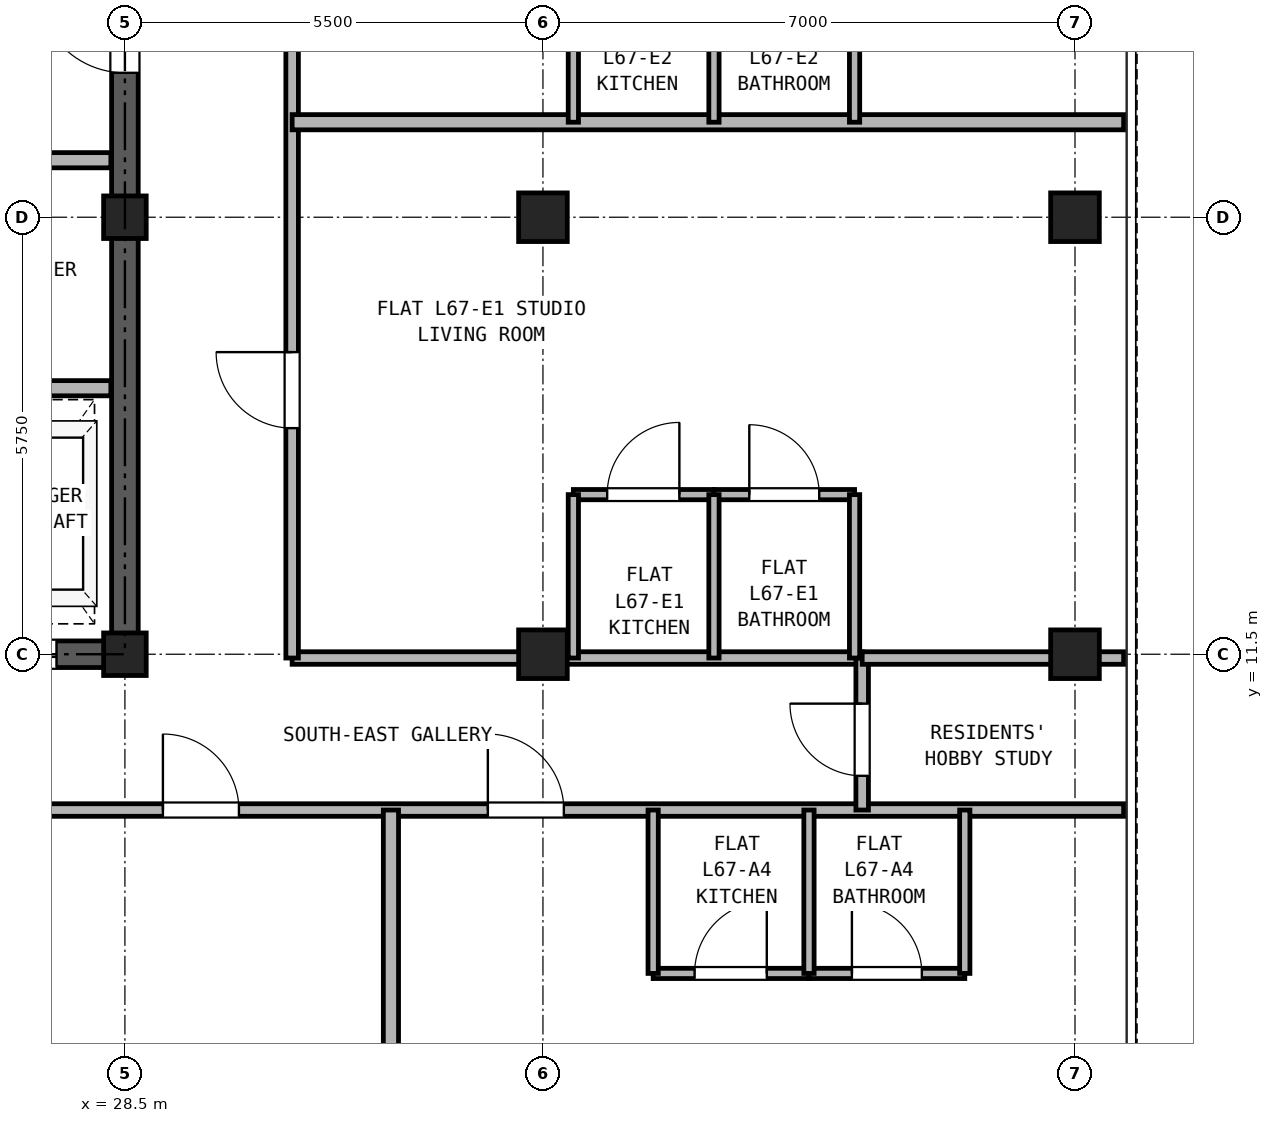
"""IFC4 building model, lengths in metres.
Left out: names, types, materials, properties, quantities, classifications, styles, units other than length and angle.
Written with IfcOpenShell. Run it as: python <this file> out.ifc"""

import sys

from ifc_helpers import new_model, si_unit, direction, frame, frame_2d, origin, origin_2d, place, context, subcontext, project, spatial, rectangle, hollow_rectangle, extrude, source, transform, mapped, element, fill, save


model = new_model("IFC4")
c1 = context("Model", 3, precision=1e-05, world=origin(), true_north=direction((0.0, 1.0)))
c2 = subcontext(c1, "Body", "Model", "MODEL_VIEW")
j1 = project(units=[si_unit("LENGTHUNIT", "METRE"), si_unit("PLANEANGLEUNIT", "RADIAN")], contexts=[c1])
p1 = place(None, origin())
s1 = spatial("IfcSite", under=j1, at=p1, CompositionType="ELEMENT")
p2 = place(p1, origin())
s2 = spatial("IfcBuilding", under=s1, at=p2, CompositionType="ELEMENT")
p3 = place(p2, frame((0.0, 0.0, 236.1)))
s3 = spatial("IfcBuildingStorey", under=s2, at=p3, CompositionType="ELEMENT", Elevation=236.1)
m1 = source(origin(), c2, "Body", "SweptSolid", [
    extrude(hollow_rectangle(XDim=0.64, YDim=0.64, WallThickness=0.035, at=origin_2d()), origin(), (0.0, 0.0, 1.0), 2.98),
])
for number, where, z_axis, x_axis in (
    (1, (41.0, 11.5, 0.0), (0.0, 0.0, 1.0), (1.0, 0.0, 0.0)),
    (2, (41.0, 17.25, 0.0), (0.0, 0.0, 1.0), (1.0, 0.0, 0.0)),
):
    element("IfcColumn", number, at=place(p3, frame(where, z_axis=z_axis, x_axis=x_axis)), inside=s3, PredefinedType="COLUMN", context=c2, shape_type="MappedRepresentation", body=[
        mapped(m1, transform((0.0, 0.0, 0.0), x_axis=(1.0, 0.0, 0.0), y_axis=(0.0, 1.0, 0.0), z_axis=(0.0, 0.0, 1.0), scale=1.0)),
    ])
m2 = source(origin(), c2, "Body", "SweptSolid", [
    extrude(hollow_rectangle(XDim=0.56, YDim=0.56, WallThickness=0.03, at=origin_2d()), origin(), (0.0, 0.0, 1.0), 2.98),
])
for number, where, z_axis, x_axis in (
    (3, (28.5, 11.5, 0.0), (0.0, 0.0, 1.0), (1.0, 0.0, 0.0)),
    (4, (28.5, 17.25, 0.0), (0.0, 0.0, 1.0), (1.0, 0.0, 0.0)),
):
    element("IfcColumn", number, at=place(p3, frame(where, z_axis=z_axis, x_axis=x_axis)), inside=s3, PredefinedType="COLUMN", context=c2, shape_type="MappedRepresentation", body=[
        mapped(m2, transform((0.0, 0.0, 0.0), x_axis=(1.0, 0.0, 0.0), y_axis=(0.0, 1.0, 0.0), z_axis=(0.0, 0.0, 1.0), scale=1.0)),
    ])
for number, where, z_axis, x_axis in (
    (5, (34.0, 11.5, 0.0), (0.0, 0.0, 1.0), (1.0, 0.0, 0.0)),
    (6, (34.0, 17.25, 0.0), (0.0, 0.0, 1.0), (1.0, 0.0, 0.0)),
):
    element("IfcColumn", number, at=place(p3, frame(where, z_axis=z_axis, x_axis=x_axis)), inside=s3, PredefinedType="COLUMN", context=c2, shape_type="MappedRepresentation", body=[
        mapped(m1, transform((0.0, 0.0, 0.0), x_axis=(1.0, 0.0, 0.0), y_axis=(0.0, 1.0, 0.0), z_axis=(0.0, 0.0, 1.0), scale=1.0)),
    ])
p4 = place(p3, frame((18.325, 11.5, 0.0), z_axis=(0.0, 0.0, 1.0), x_axis=(1.0, 0.0, 0.0)))
e7 = element("IfcWall", 7, at=p4, inside=s3, PredefinedType="SHEAR", context=c2, shape_type="SweptSolid", body=[
    extrude(rectangle(XDim=10.35, YDim=0.35, at=frame_2d((5.175, 0.0))), origin(), (0.0, 0.0, 1.0), 2.98),
])
p5 = place(p4, frame((1.775, 0.0, 0.0)))
e8 = element("IfcOpeningElement", 8, at=p5, cuts=e7, PredefinedType="OPENING", context=c2, shape_type="SweptSolid", body=[
    extrude(rectangle(XDim=0.95, YDim=2.15, at=frame_2d((0.475, 1.075))), frame((0.0, 0.185, 0.0), z_axis=(0.0, -1.0, 0.0), x_axis=(1.0, 0.0, 0.0)), (0.0, 0.0, 1.0), 0.37),
])
p6 = place(p4, frame((5.275, 0.0, 0.0)))
e9 = element("IfcOpeningElement", 9, at=p6, cuts=e7, PredefinedType="OPENING", context=c2, shape_type="SweptSolid", body=[
    extrude(rectangle(XDim=0.95, YDim=2.15, at=frame_2d((0.475, 1.075))), frame((0.0, 0.185, 0.0), z_axis=(0.0, -1.0, 0.0), x_axis=(1.0, 0.0, 0.0)), (0.0, 0.0, 1.0), 0.37),
])
p7 = place(p4, frame((8.175, 0.0, 0.0)))
e10 = element("IfcOpeningElement", 10, at=p7, cuts=e7, PredefinedType="OPENING", context=c2, shape_type="SweptSolid", body=[
    extrude(rectangle(XDim=1.1, YDim=2.25, at=frame_2d((0.55, 1.125))), frame((0.0, 0.185, 0.0), z_axis=(0.0, -1.0, 0.0), x_axis=(1.0, 0.0, 0.0)), (0.0, 0.0, 1.0), 0.37),
])
p8 = place(p3, frame((28.5, 11.675, 0.0), z_axis=(0.0, 0.0, 1.0), x_axis=(0.0, 1.0, 0.0)))
e11 = element("IfcWall", 11, at=p8, inside=s3, PredefinedType="SHEAR", context=c2, shape_type="SweptSolid", body=[
    extrude(rectangle(XDim=16.9, YDim=0.35, at=frame_2d((8.45, 0.0))), origin(), (0.0, 0.0, 1.0), 2.98),
])
p9 = place(p8, frame((7.475, 0.0, 0.0)))
e12 = element("IfcOpeningElement", 12, at=p9, cuts=e11, PredefinedType="OPENING", context=c2, shape_type="SweptSolid", body=[
    extrude(rectangle(XDim=1.15, YDim=2.2, at=frame_2d((0.575, 1.1))), frame((0.0, 0.185, 0.0), z_axis=(0.0, -1.0, 0.0), x_axis=(1.0, 0.0, 0.0)), (0.0, 0.0, 1.0), 0.37),
])
p10 = place(p3, frame((18.685, 18.0, 0.0), z_axis=(0.0, 0.0, 1.0), x_axis=(1.0, 0.0, 0.0)))
e13 = element("IfcWall", 13, at=p10, inside=s3, PredefinedType="PARTITIONING", context=c2, shape_type="SweptSolid", body=[
    extrude(rectangle(XDim=9.63, YDim=0.2, at=frame_2d((4.815, 0.0))), origin(), (0.0, 0.0, 1.0), 2.98),
])
p11 = place(p10, frame((0.565, 0.0, 0.0)))
e14 = element("IfcOpeningElement", 14, at=p11, cuts=e13, PredefinedType="OPENING", context=c2, shape_type="SweptSolid", body=[
    extrude(rectangle(XDim=1.3, YDim=2.3, at=frame_2d((0.65, 1.15))), frame((0.0, 0.11, 0.0), z_axis=(0.0, -1.0, 0.0), x_axis=(1.0, 0.0, 0.0)), (0.0, 0.0, 1.0), 0.22),
])
p12 = place(p10, frame((2.665, 0.0, 0.0)))
e15 = element("IfcOpeningElement", 15, at=p12, cuts=e13, PredefinedType="OPENING", context=c2, shape_type="SweptSolid", body=[
    extrude(rectangle(XDim=1.3, YDim=2.3, at=frame_2d((0.65, 1.15))), frame((0.0, 0.11, 0.0), z_axis=(0.0, -1.0, 0.0), x_axis=(1.0, 0.0, 0.0)), (0.0, 0.0, 1.0), 0.22),
])
p13 = place(p10, frame((5.065, 0.0, 0.0)))
e16 = element("IfcOpeningElement", 16, at=p13, cuts=e13, PredefinedType="OPENING", context=c2, shape_type="SweptSolid", body=[
    extrude(rectangle(XDim=0.9, YDim=2.05, at=frame_2d((0.45, 1.025))), frame((0.0, 0.11, 0.0), z_axis=(0.0, -1.0, 0.0), x_axis=(1.0, 0.0, 0.0)), (0.0, 0.0, 1.0), 0.22),
])
p14 = place(p10, frame((7.765, 0.0, 0.0)))
e17 = element("IfcOpeningElement", 17, at=p14, cuts=e13, PredefinedType="OPENING", context=c2, shape_type="SweptSolid", body=[
    extrude(rectangle(XDim=0.9, YDim=2.05, at=frame_2d((0.45, 1.025))), frame((0.0, 0.11, 0.0), z_axis=(0.0, -1.0, 0.0), x_axis=(1.0, 0.0, 0.0)), (0.0, 0.0, 1.0), 0.22),
])
p15 = place(p3, frame((18.685, 15.0, 0.0), z_axis=(0.0, 0.0, 1.0), x_axis=(1.0, 0.0, 0.0)))
e18 = element("IfcWall", 18, at=p15, inside=s3, PredefinedType="PARTITIONING", context=c2, shape_type="SweptSolid", body=[
    extrude(rectangle(XDim=9.63, YDim=0.2, at=frame_2d((4.815, 0.0))), origin(), (0.0, 0.0, 1.0), 2.98),
])
p16 = place(p3, frame((5.36, 9.45, 0.0), z_axis=(0.0, 0.0, 1.0), x_axis=(1.0, 0.0, 0.0)))
e19 = element("IfcWall", 19, at=p16, inside=s3, PredefinedType="PARTITIONING", context=c2, shape_type="SweptSolid", body=[
    extrude(rectangle(XDim=36.28, YDim=0.165, at=frame_2d((18.14, 0.0))), origin(), (0.0, 0.0, 1.0), 2.98),
])
p17 = place(p16, frame((7.115, 0.0, 0.0)))
e20 = element("IfcOpeningElement", 20, at=p17, cuts=e19, PredefinedType="OPENING", context=c2, shape_type="SweptSolid", body=[
    extrude(rectangle(XDim=1.0, YDim=2.15, at=frame_2d((0.5, 1.075))), frame((0.0, 0.093, 0.0), z_axis=(0.0, -1.0, 0.0), x_axis=(1.0, 0.0, 0.0)), (0.0, 0.0, 1.0), 0.185),
])
p18 = place(p16, frame((10.89, 0.0, 0.0)))
e21 = element("IfcOpeningElement", 21, at=p18, cuts=e19, PredefinedType="OPENING", context=c2, shape_type="SweptSolid", body=[
    extrude(rectangle(XDim=1.0, YDim=2.15, at=frame_2d((0.5, 1.075))), frame((0.0, 0.093, 0.0), z_axis=(0.0, -1.0, 0.0), x_axis=(1.0, 0.0, 0.0)), (0.0, 0.0, 1.0), 0.185),
])
p19 = place(p16, frame((23.64, 0.0, 0.0)))
e22 = element("IfcOpeningElement", 22, at=p19, cuts=e19, PredefinedType="OPENING", context=c2, shape_type="SweptSolid", body=[
    extrude(rectangle(XDim=1.0, YDim=2.15, at=frame_2d((0.5, 1.075))), frame((0.0, 0.093, 0.0), z_axis=(0.0, -1.0, 0.0), x_axis=(1.0, 0.0, 0.0)), (0.0, 0.0, 1.0), 0.185),
])
p20 = place(p16, frame((27.915, 0.0, 0.0)))
e23 = element("IfcOpeningElement", 23, at=p20, cuts=e19, PredefinedType="OPENING", context=c2, shape_type="SweptSolid", body=[
    extrude(rectangle(XDim=1.0, YDim=2.15, at=frame_2d((0.5, 1.075))), frame((0.0, 0.093, 0.0), z_axis=(0.0, -1.0, 0.0), x_axis=(1.0, 0.0, 0.0)), (0.0, 0.0, 1.0), 0.185),
])
p21 = place(p3, frame((30.7, 11.45, 0.0), z_axis=(0.0, 0.0, 1.0), x_axis=(1.0, 0.0, 0.0)))
e24 = element("IfcWall", 24, at=p21, inside=s3, PredefinedType="PARTITIONING", context=c2, shape_type="SweptSolid", body=[
    extrude(rectangle(XDim=7.5, YDim=0.165, at=frame_2d((3.75, 0.0))), origin(), (0.0, 0.0, 1.0), 2.428),
])
p22 = place(p3, frame((38.2, 9.45, 0.0), z_axis=(0.0, 0.0, 1.0), x_axis=(0.0, 1.0, 0.0)))
e25 = element("IfcWall", 25, at=p22, inside=s3, PredefinedType="PARTITIONING", context=c2, shape_type="SweptSolid", body=[
    extrude(rectangle(XDim=2.0, YDim=0.165, at=frame_2d((1.0, 0.0))), origin(), (0.0, 0.0, 1.0), 2.98),
])
p23 = place(p22, frame((0.45, 0.0, 0.0)))
e26 = element("IfcOpeningElement", 26, at=p23, cuts=e25, PredefinedType="OPENING", context=c2, shape_type="SweptSolid", body=[
    extrude(rectangle(XDim=0.95, YDim=2.15, at=frame_2d((0.475, 1.075))), frame((0.0, 0.093, 0.0), z_axis=(0.0, -1.0, 0.0), x_axis=(1.0, 0.0, 0.0)), (0.0, 0.0, 1.0), 0.185),
])
p24 = place(p3, frame((30.7, 11.45, 0.0), z_axis=(0.0, 0.0, 1.0), x_axis=(0.0, 1.0, 0.0)))
e27 = element("IfcWall", 27, at=p24, inside=s3, PredefinedType="PARTITIONING", context=c2, shape_type="SweptSolid", body=[
    extrude(rectangle(XDim=23.69, YDim=0.165, at=frame_2d((11.845, 0.0))), origin(), (0.0, 0.0, 1.0), 2.98),
])
p25 = place(p24, frame((3.025, 0.0, 0.0)))
e28 = element("IfcOpeningElement", 28, at=p25, cuts=e27, PredefinedType="OPENING", context=c2, shape_type="SweptSolid", body=[
    extrude(rectangle(XDim=1.0, YDim=2.15, at=frame_2d((0.5, 1.075))), frame((0.0, 0.093, 0.0), z_axis=(0.0, -1.0, 0.0), x_axis=(1.0, 0.0, 0.0)), (0.0, 0.0, 1.0), 0.185),
])
p26 = place(p24, frame((10.8, 0.0, 0.0)))
e29 = element("IfcOpeningElement", 29, at=p26, cuts=e27, PredefinedType="OPENING", context=c2, shape_type="SweptSolid", body=[
    extrude(rectangle(XDim=1.0, YDim=2.15, at=frame_2d((0.5, 1.075))), frame((0.0, 0.093, 0.0), z_axis=(0.0, -1.0, 0.0), x_axis=(1.0, 0.0, 0.0)), (0.0, 0.0, 1.0), 0.185),
])
p27 = place(p24, frame((16.825, 0.0, 0.0)))
e30 = element("IfcOpeningElement", 30, at=p27, cuts=e27, PredefinedType="OPENING", context=c2, shape_type="SweptSolid", body=[
    extrude(rectangle(XDim=1.0, YDim=2.15, at=frame_2d((0.5, 1.075))), frame((0.0, 0.093, 0.0), z_axis=(0.0, -1.0, 0.0), x_axis=(1.0, 0.0, 0.0)), (0.0, 0.0, 1.0), 0.185),
])
p28 = place(p3, frame((32.0, 0.16, 0.0), z_axis=(0.0, 0.0, 1.0), x_axis=(0.0, 1.0, 0.0)))
e31 = element("IfcWall", 31, at=p28, inside=s3, PredefinedType="PARTITIONING", context=c2, shape_type="SweptSolid", body=[
    extrude(rectangle(XDim=9.29, YDim=0.2, at=frame_2d((4.645, 0.0))), origin(), (0.0, 0.0, 1.0), 2.98),
])
p29 = place(p3, frame((35.45, 7.3, 0.0), z_axis=(0.0, 0.0, 1.0), x_axis=(1.0, 0.0, 0.0)))
e32 = element("IfcWall", 32, at=p29, inside=s3, PredefinedType="PARTITIONING", context=c2, shape_type="SweptSolid", body=[
    extrude(rectangle(XDim=2.05, YDim=0.135, at=frame_2d((1.025, 0.0))), origin(), (0.0, 0.0, 1.0), 2.98),
])
p30 = place(p29, frame((0.545, 0.0, 0.0)))
e33 = element("IfcOpeningElement", 33, at=p30, cuts=e32, PredefinedType="OPENING", context=c2, shape_type="SweptSolid", body=[
    extrude(rectangle(XDim=0.95, YDim=2.15, at=frame_2d((0.475, 1.075))), frame((0.0, 0.077, 0.0), z_axis=(0.0, -1.0, 0.0), x_axis=(1.0, 0.0, 0.0)), (0.0, 0.0, 1.0), 0.155),
])
p31 = place(p3, frame((37.5, 7.3, 0.0), z_axis=(0.0, 0.0, 1.0), x_axis=(1.0, 0.0, 0.0)))
e34 = element("IfcWall", 34, at=p31, inside=s3, PredefinedType="PARTITIONING", context=c2, shape_type="SweptSolid", body=[
    extrude(rectangle(XDim=2.05, YDim=0.135, at=frame_2d((1.025, 0.0))), origin(), (0.0, 0.0, 1.0), 2.98),
])
p32 = place(p31, frame((0.565, 0.0, 0.0)))
e35 = element("IfcOpeningElement", 35, at=p32, cuts=e34, PredefinedType="OPENING", context=c2, shape_type="SweptSolid", body=[
    extrude(rectangle(XDim=0.92, YDim=2.1, at=frame_2d((0.46, 1.05))), frame((0.0, 0.077, 0.0), z_axis=(0.0, -1.0, 0.0), x_axis=(1.0, 0.0, 0.0)), (0.0, 0.0, 1.0), 0.155),
])
for number, where, z_axis, x_axis in (
    (36, (35.45, 7.3, 0.0), (0.0, 0.0, 1.0), (0.0, 1.0, 0.0)),
    (37, (37.5, 7.3, 0.0), (0.0, 0.0, 1.0), (0.0, 1.0, 0.0)),
    (38, (39.55, 7.3, 0.0), (0.0, 0.0, 1.0), (0.0, 1.0, 0.0)),
):
    element("IfcWall", number, at=place(p3, frame(where, z_axis=z_axis, x_axis=x_axis)), inside=s3, PredefinedType="PARTITIONING", context=c2, shape_type="SweptSolid", body=[
        extrude(rectangle(XDim=2.15, YDim=0.135, at=frame_2d((1.075, 0.0))), origin(), (0.0, 0.0, 1.0), 2.98),
    ])
p33 = place(p3, frame((38.2, 11.45, 0.0), z_axis=(0.0, 0.0, 1.0), x_axis=(1.0, 0.0, 0.0)))
e39 = element("IfcWall", 39, at=p33, inside=s3, PredefinedType="PARTITIONING", context=c2, shape_type="SweptSolid", body=[
    extrude(rectangle(XDim=3.44, YDim=0.165, at=frame_2d((1.72, 0.0))), origin(), (0.0, 0.0, 1.0), 2.428),
])
p34 = place(p3, frame((34.4, 13.6, 0.0), z_axis=(0.0, 0.0, 1.0), x_axis=(1.0, 0.0, 0.0)))
e40 = element("IfcWall", 40, at=p34, inside=s3, PredefinedType="PARTITIONING", context=c2, shape_type="SweptSolid", body=[
    extrude(rectangle(XDim=1.85, YDim=0.135, at=frame_2d((0.925, 0.0))), origin(), (0.0, 0.0, 1.0), 2.98),
])
p35 = place(p34, frame((0.445, 0.0, 0.0)))
e41 = element("IfcOpeningElement", 41, at=p35, cuts=e40, PredefinedType="OPENING", context=c2, shape_type="SweptSolid", body=[
    extrude(rectangle(XDim=0.95, YDim=2.15, at=frame_2d((0.475, 1.075))), frame((0.0, 0.077, 0.0), z_axis=(0.0, -1.0, 0.0), x_axis=(1.0, 0.0, 0.0)), (0.0, 0.0, 1.0), 0.155),
])
p36 = place(p3, frame((36.25, 13.6, 0.0), z_axis=(0.0, 0.0, 1.0), x_axis=(1.0, 0.0, 0.0)))
e42 = element("IfcWall", 42, at=p36, inside=s3, PredefinedType="PARTITIONING", context=c2, shape_type="SweptSolid", body=[
    extrude(rectangle(XDim=1.85, YDim=0.135, at=frame_2d((0.925, 0.0))), origin(), (0.0, 0.0, 1.0), 2.98),
])
p37 = place(p36, frame((0.465, 0.0, 0.0)))
e43 = element("IfcOpeningElement", 43, at=p37, cuts=e42, PredefinedType="OPENING", context=c2, shape_type="SweptSolid", body=[
    extrude(rectangle(XDim=0.92, YDim=2.1, at=frame_2d((0.46, 1.05))), frame((0.0, 0.077, 0.0), z_axis=(0.0, -1.0, 0.0), x_axis=(1.0, 0.0, 0.0)), (0.0, 0.0, 1.0), 0.155),
])
for number, where, z_axis, x_axis in (
    (44, (34.4, 11.45, 0.0), (0.0, 0.0, 1.0), (0.0, 1.0, 0.0)),
    (45, (36.25, 11.45, 0.0), (0.0, 0.0, 1.0), (0.0, 1.0, 0.0)),
    (46, (38.1, 11.45, 0.0), (0.0, 0.0, 1.0), (0.0, 1.0, 0.0)),
):
    element("IfcWall", number, at=place(p3, frame(where, z_axis=z_axis, x_axis=x_axis)), inside=s3, PredefinedType="PARTITIONING", context=c2, shape_type="SweptSolid", body=[
        extrude(rectangle(XDim=2.15, YDim=0.135, at=frame_2d((1.075, 0.0))), origin(), (0.0, 0.0, 1.0), 2.98),
    ])
p38 = place(p3, frame((30.7, 18.5, 0.0), z_axis=(0.0, 0.0, 1.0), x_axis=(1.0, 0.0, 0.0)))
e47 = element("IfcWall", 47, at=p38, inside=s3, PredefinedType="PARTITIONING", context=c2, shape_type="SweptSolid", body=[
    extrude(rectangle(XDim=10.94, YDim=0.2, at=frame_2d((5.47, 0.0))), origin(), (0.0, 0.0, 1.0), 2.98),
])
for number, where, z_axis, x_axis in (
    (48, (34.4, 18.5, 0.0), (0.0, 0.0, 1.0), (0.0, 1.0, 0.0)),
    (49, (36.25, 18.5, 0.0), (0.0, 0.0, 1.0), (0.0, 1.0, 0.0)),
    (50, (38.1, 18.5, 0.0), (0.0, 0.0, 1.0), (0.0, 1.0, 0.0)),
):
    element("IfcWall", number, at=place(p3, frame(where, z_axis=z_axis, x_axis=x_axis)), inside=s3, PredefinedType="PARTITIONING", context=c2, shape_type="SweptSolid", body=[
        extrude(rectangle(XDim=2.15, YDim=0.135, at=frame_2d((1.075, 0.0))), origin(), (0.0, 0.0, 1.0), 2.98),
    ])
p39 = place(p9, origin())
e51 = element("IfcDoor", 51, at=p39, inside=s3, OperationType="SINGLE_SWING_RIGHT", PredefinedType="DOOR", context=c2, shape_type="SweptSolid", body=[
    extrude(rectangle(XDim=1.15, YDim=2.2, at=frame_2d((0.575, 1.1))), frame((0.0, 0.025, 0.0), z_axis=(0.0, -1.0, 0.0), x_axis=(1.0, 0.0, 0.0)), (0.0, 0.0, 1.0), 0.05),
])
fill(e12, e51)
p40 = place(p7, frame((1.1, 0.0, 0.0), z_axis=(0.0, 0.0, 1.0), x_axis=(-1.0, 0.0, 0.0)))
e52 = element("IfcDoor", 52, at=p40, inside=s3, OperationType="DOUBLE_DOOR_SLIDING", PredefinedType="DOOR", context=c2, shape_type="SweptSolid", body=[
    extrude(rectangle(XDim=1.1, YDim=2.25, at=frame_2d((0.55, 1.125))), frame((0.0, 0.025, 0.0), z_axis=(0.0, -1.0, 0.0), x_axis=(1.0, 0.0, 0.0)), (0.0, 0.0, 1.0), 0.05),
])
fill(e10, e52)
p41 = place(p19, frame((1.0, 0.0, 0.0), z_axis=(0.0, 0.0, 1.0), x_axis=(-1.0, 0.0, 0.0)))
e53 = element("IfcDoor", 53, at=p41, inside=s3, OperationType="SINGLE_SWING_LEFT", PredefinedType="DOOR", context=c2, shape_type="SweptSolid", body=[
    extrude(rectangle(XDim=1.0, YDim=2.15, at=frame_2d((0.5, 1.075))), frame((0.0, 0.025, 0.0), z_axis=(0.0, -1.0, 0.0), x_axis=(1.0, 0.0, 0.0)), (0.0, 0.0, 1.0), 0.05),
])
fill(e22, e53)
p42 = place(p30, origin())
e54 = element("IfcDoor", 54, at=p42, inside=s3, OperationType="SINGLE_SWING_RIGHT", PredefinedType="DOOR", context=c2, shape_type="SweptSolid", body=[
    extrude(rectangle(XDim=0.95, YDim=2.15, at=frame_2d((0.475, 1.075))), frame((0.0, 0.025, 0.0), z_axis=(0.0, -1.0, 0.0), x_axis=(1.0, 0.0, 0.0)), (0.0, 0.0, 1.0), 0.05),
])
fill(e33, e54)
p43 = place(p32, origin())
e55 = element("IfcDoor", 55, at=p43, inside=s3, OperationType="SINGLE_SWING_LEFT", PredefinedType="DOOR", context=c2, shape_type="SweptSolid", body=[
    extrude(rectangle(XDim=0.92, YDim=2.1, at=frame_2d((0.46, 1.05))), frame((0.0, 0.025, 0.0), z_axis=(0.0, -1.0, 0.0), x_axis=(1.0, 0.0, 0.0)), (0.0, 0.0, 1.0), 0.05),
])
fill(e35, e55)
p44 = place(p20, frame((1.0, 0.0, 0.0), z_axis=(0.0, 0.0, 1.0), x_axis=(-1.0, 0.0, 0.0)))
e56 = element("IfcDoor", 56, at=p44, inside=s3, OperationType="SINGLE_SWING_LEFT", PredefinedType="DOOR", context=c2, shape_type="SweptSolid", body=[
    extrude(rectangle(XDim=1.0, YDim=2.15, at=frame_2d((0.5, 1.075))), frame((0.0, 0.025, 0.0), z_axis=(0.0, -1.0, 0.0), x_axis=(1.0, 0.0, 0.0)), (0.0, 0.0, 1.0), 0.05),
])
fill(e23, e56)
p45 = place(p23, origin())
e57 = element("IfcDoor", 57, at=p45, inside=s3, OperationType="SINGLE_SWING_RIGHT", PredefinedType="DOOR", context=c2, shape_type="SweptSolid", body=[
    extrude(rectangle(XDim=0.95, YDim=2.15, at=frame_2d((0.475, 1.075))), frame((0.0, 0.025, 0.0), z_axis=(0.0, -1.0, 0.0), x_axis=(1.0, 0.0, 0.0)), (0.0, 0.0, 1.0), 0.05),
])
fill(e26, e57)
p46 = place(p35, origin())
e58 = element("IfcDoor", 58, at=p46, inside=s3, OperationType="SINGLE_SWING_RIGHT", PredefinedType="DOOR", context=c2, shape_type="SweptSolid", body=[
    extrude(rectangle(XDim=0.95, YDim=2.15, at=frame_2d((0.475, 1.075))), frame((0.0, 0.025, 0.0), z_axis=(0.0, -1.0, 0.0), x_axis=(1.0, 0.0, 0.0)), (0.0, 0.0, 1.0), 0.05),
])
fill(e41, e58)
p47 = place(p37, origin())
e59 = element("IfcDoor", 59, at=p47, inside=s3, OperationType="SINGLE_SWING_LEFT", PredefinedType="DOOR", context=c2, shape_type="SweptSolid", body=[
    extrude(rectangle(XDim=0.92, YDim=2.1, at=frame_2d((0.46, 1.05))), frame((0.0, 0.025, 0.0), z_axis=(0.0, -1.0, 0.0), x_axis=(1.0, 0.0, 0.0)), (0.0, 0.0, 1.0), 0.05),
])
fill(e43, e59)
p48 = place(p25, frame((1.0, 0.0, 0.0), z_axis=(0.0, 0.0, 1.0), x_axis=(-1.0, 0.0, 0.0)))
e60 = element("IfcDoor", 60, at=p48, inside=s3, OperationType="SINGLE_SWING_RIGHT", PredefinedType="DOOR", context=c2, shape_type="SweptSolid", body=[
    extrude(rectangle(XDim=1.0, YDim=2.15, at=frame_2d((0.5, 1.075))), frame((0.0, 0.025, 0.0), z_axis=(0.0, -1.0, 0.0), x_axis=(1.0, 0.0, 0.0)), (0.0, 0.0, 1.0), 0.05),
])
fill(e28, e60)
save(model, sys.argv[1])
